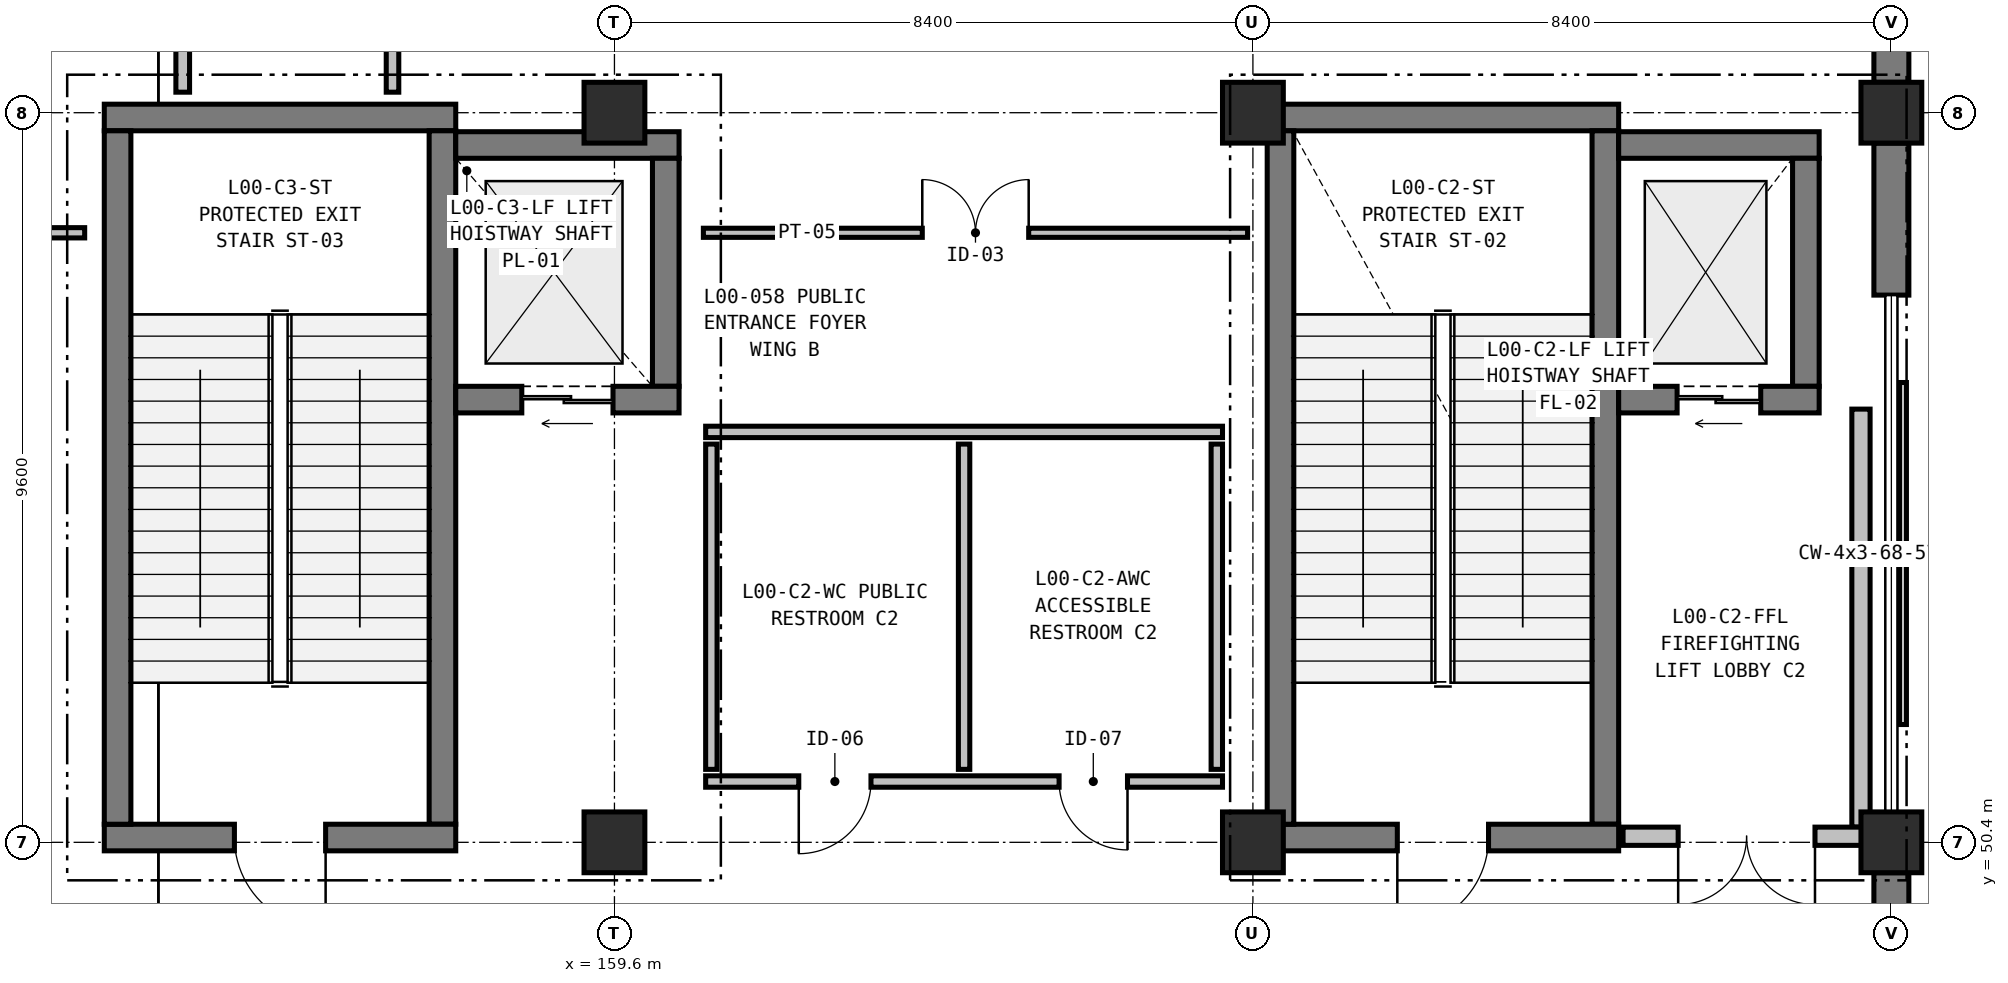
"""IFC4 building model, lengths in metres.
Left out: names, types, materials, properties, quantities, classifications, styles, units other than length and angle.
Written with IfcOpenShell. Run it as: python <this file> out.ifc"""

import sys

from ifc_helpers import new_model, si_unit, direction, frame, frame_2d, origin, origin_2d, place, context, subcontext, project, spatial, rectangle, extrude, element, fill, save


model = new_model("IFC4")
c1 = context("Model", 3, precision=1e-05, world=origin(), true_north=direction((0.0, 1.0)))
c2 = subcontext(c1, "Body", "Model", "MODEL_VIEW")
j1 = project(units=[si_unit("LENGTHUNIT", "METRE"), si_unit("PLANEANGLEUNIT", "RADIAN")], contexts=[c1])
p1 = place(None, origin())
s1 = spatial("IfcSite", under=j1, at=p1, CompositionType="ELEMENT")
p2 = place(p1, origin())
s2 = spatial("IfcBuilding", under=s1, at=p2, CompositionType="ELEMENT")
p3 = place(p2, origin())
s3 = spatial("IfcBuildingStorey", under=s2, at=p3, CompositionType="ELEMENT", Elevation=0.0)
for number, where, z_axis, x_axis in (
    (1, (159.6, 50.4, 0.0), (0.0, 0.0, 1.0), (1.0, 0.0, 0.0)),
    (2, (159.6, 60.0, 0.0), (0.0, 0.0, 1.0), (1.0, 0.0, 0.0)),
    (3, (168.0, 50.4, 0.0), (0.0, 0.0, 1.0), (1.0, 0.0, 0.0)),
    (4, (168.0, 60.0, 0.0), (0.0, 0.0, 1.0), (1.0, 0.0, 0.0)),
    (5, (176.4, 50.4, 0.0), (0.0, 0.0, 1.0), (1.0, 0.0, 0.0)),
    (6, (176.4, 60.0, 0.0), (0.0, 0.0, 1.0), (1.0, 0.0, 0.0)),
):
    element("IfcColumn", number, at=place(p3, frame(where, z_axis=z_axis, x_axis=x_axis)), inside=s3, PredefinedType="COLUMN", context=c2, shape_type="SweptSolid", body=[
        extrude(rectangle(XDim=0.8, YDim=0.8, at=origin_2d()), origin(), (0.0, 0.0, 1.0), 6.0),
    ])
p4 = place(p3, frame((176.4, 69.2, 0.0), z_axis=(0.0, 0.0, 1.0), x_axis=(0.0, -1.0, 0.0)))
e7 = element("IfcWall", 7, at=p4, inside=s3, PredefinedType="SOLIDWALL", context=c2, shape_type="SweptSolid", body=[
    extrude(rectangle(XDim=8.8, YDim=0.46, at=frame_2d((4.4, 0.0))), origin(), (0.0, 0.0, 1.0), 5.68),
])
p5 = place(p4, frame((3.4, 0.0, 0.0)))
e8 = element("IfcOpeningElement", 8, at=p5, cuts=e7, PredefinedType="OPENING", context=c2, shape_type="SweptSolid", body=[
    extrude(rectangle(XDim=2.0, YDim=2.3, at=frame_2d((1.0, 1.15))), frame((0.0, 0.24, 0.0), z_axis=(0.0, -1.0, 0.0), x_axis=(1.0, 0.0, 0.0)), (0.0, 0.0, 1.0), 0.48),
])
p6 = place(p3, frame((176.4, 59.6, 0.0), z_axis=(0.0, 0.0, 1.0), x_axis=(0.0, -1.0, 0.0)))
e9 = element("IfcWall", 9, at=p6, inside=s3, PredefinedType="SOLIDWALL", context=c2, shape_type="SweptSolid", body=[
    extrude(rectangle(XDim=2.0, YDim=0.46, at=frame_2d((1.0, 0.0))), origin(), (0.0, 0.0, 1.0), 5.68),
])
p7 = place(p3, frame((176.4, 50.0, 0.0), z_axis=(0.0, 0.0, 1.0), x_axis=(0.0, -1.0, 0.0)))
e10 = element("IfcWall", 10, at=p7, inside=s3, PredefinedType="SOLIDWALL", context=c2, shape_type="SweptSolid", body=[
    extrude(rectangle(XDim=4.0, YDim=0.46, at=frame_2d((2.0, 0.0))), origin(), (0.0, 0.0, 1.0), 5.68),
])
p8 = place(p3, frame((168.188, 59.937, 0.0), z_axis=(0.0, 0.0, 1.0), x_axis=(1.0, 0.0, 0.0)))
e11 = element("IfcWall", 11, at=p8, inside=s3, PredefinedType="SHEAR", context=c2, shape_type="SweptSolid", body=[
    extrude(rectangle(XDim=4.624, YDim=0.35, at=frame_2d((2.312, 0.0))), origin(), (0.0, 0.0, 1.0), 5.68),
])
p9 = place(p3, frame((172.637, 59.762, 0.0), z_axis=(0.0, 0.0, 1.0), x_axis=(0.0, -1.0, 0.0)))
e12 = element("IfcWall", 12, at=p9, inside=s3, PredefinedType="SHEAR", context=c2, shape_type="SweptSolid", body=[
    extrude(rectangle(XDim=9.124, YDim=0.35, at=frame_2d((4.562, 0.0))), origin(), (0.0, 0.0, 1.0), 5.68),
])
p10 = place(p3, frame((172.812, 50.463, 0.0), z_axis=(0.0, 0.0, 1.0), x_axis=(-1.0, 0.0, 0.0)))
e13 = element("IfcWall", 13, at=p10, inside=s3, PredefinedType="SHEAR", context=c2, shape_type="SweptSolid", body=[
    extrude(rectangle(XDim=4.624, YDim=0.35, at=frame_2d((2.312, 0.0))), origin(), (0.0, 0.0, 1.0), 5.68),
])
p11 = place(p10, frame((1.712, 0.0, 0.0)))
e14 = element("IfcOpeningElement", 14, at=p11, cuts=e13, PredefinedType="OPENING", context=c2, shape_type="SweptSolid", body=[
    extrude(rectangle(XDim=1.2, YDim=2.2, at=frame_2d((0.6, 1.1))), frame((0.0, 0.185, 0.0), z_axis=(0.0, -1.0, 0.0), x_axis=(1.0, 0.0, 0.0)), (0.0, 0.0, 1.0), 0.37),
])
p12 = place(p3, frame((168.363, 50.638, 0.0), z_axis=(0.0, 0.0, 1.0), x_axis=(0.0, 1.0, 0.0)))
e15 = element("IfcWall", 15, at=p12, inside=s3, PredefinedType="SHEAR", context=c2, shape_type="SweptSolid", body=[
    extrude(rectangle(XDim=9.124, YDim=0.35, at=frame_2d((4.562, 0.0))), origin(), (0.0, 0.0, 1.0), 5.68),
])
p13 = place(p3, frame((172.812, 59.575, 0.0), z_axis=(0.0, 0.0, 1.0), x_axis=(1.0, 0.0, 0.0)))
e16 = element("IfcWall", 16, at=p13, inside=s3, PredefinedType="SHEAR", context=c2, shape_type="SweptSolid", body=[
    extrude(rectangle(XDim=2.638, YDim=0.35, at=frame_2d((1.319, 0.0))), origin(), (0.0, 0.0, 1.0), 5.68),
])
p14 = place(p3, frame((175.275, 59.4, 0.0), z_axis=(0.0, 0.0, 1.0), x_axis=(0.0, -1.0, 0.0)))
e17 = element("IfcWall", 17, at=p14, inside=s3, PredefinedType="SHEAR", context=c2, shape_type="SweptSolid", body=[
    extrude(rectangle(XDim=3.0, YDim=0.35, at=frame_2d((1.5, 0.0))), origin(), (0.0, 0.0, 1.0), 5.68),
])
p15 = place(p3, frame((175.45, 56.225, 0.0), z_axis=(0.0, 0.0, 1.0), x_axis=(-1.0, 0.0, 0.0)))
e18 = element("IfcWall", 18, at=p15, inside=s3, PredefinedType="SHEAR", context=c2, shape_type="SweptSolid", body=[
    extrude(rectangle(XDim=2.638, YDim=0.35, at=frame_2d((1.319, 0.0))), origin(), (0.0, 0.0, 1.0), 5.68),
])
p16 = place(p15, frame((0.769, 0.0, 0.0)))
e19 = element("IfcOpeningElement", 19, at=p16, cuts=e18, PredefinedType="OPENING", context=c2, shape_type="SweptSolid", body=[
    extrude(rectangle(XDim=1.1, YDim=2.2, at=frame_2d((0.55, 1.1))), frame((0.0, 0.185, 0.0), z_axis=(0.0, -1.0, 0.0), x_axis=(1.0, 0.0, 0.0)), (0.0, 0.0, 1.0), 0.37),
])
p17 = place(p3, frame((176.0, 56.1, 0.0), z_axis=(0.0, 0.0, 1.0), x_axis=(0.0, -1.0, 0.0)))
e20 = element("IfcWall", 20, at=p17, inside=s3, PredefinedType="PARTITIONING", context=c2, shape_type="SweptSolid", body=[
    extrude(rectangle(XDim=5.5, YDim=0.24, at=frame_2d((2.75, 0.0))), origin(), (0.0, 0.0, 1.0), 5.005),
])
p18 = place(p3, frame((176.12, 50.48, 0.0), z_axis=(0.0, 0.0, 1.0), x_axis=(-1.0, 0.0, 0.0)))
e21 = element("IfcWall", 21, at=p18, inside=s3, PredefinedType="PARTITIONING", context=c2, shape_type="SweptSolid", body=[
    extrude(rectangle(XDim=3.25, YDim=0.24, at=frame_2d((1.625, 0.0))), origin(), (0.0, 0.0, 1.0), 5.005),
])
p19 = place(p18, frame((0.725, 0.0, 0.0)))
e22 = element("IfcOpeningElement", 22, at=p19, cuts=e21, PredefinedType="OPENING", context=c2, shape_type="SweptSolid", body=[
    extrude(rectangle(XDim=1.8, YDim=2.25, at=frame_2d((0.9, 1.125))), frame((0.0, 0.13, 0.0), z_axis=(0.0, -1.0, 0.0), x_axis=(1.0, 0.0, 0.0)), (0.0, 0.0, 1.0), 0.26),
])
p20 = place(p3, frame((167.6, 51.2, 0.0), z_axis=(0.0, 0.0, 1.0), x_axis=(-1.0, 0.0, 0.0)))
e23 = element("IfcWall", 23, at=p20, inside=s3, PredefinedType="PARTITIONING", context=c2, shape_type="SweptSolid", body=[
    extrude(rectangle(XDim=6.8, YDim=0.15, at=frame_2d((3.4, 0.0))), origin(), (0.0, 0.0, 1.0), 5.68),
])
p21 = place(p20, frame((1.25, 0.0, 0.0)))
e24 = element("IfcOpeningElement", 24, at=p21, cuts=e23, PredefinedType="OPENING", context=c2, shape_type="SweptSolid", body=[
    extrude(rectangle(XDim=0.9, YDim=2.1, at=frame_2d((0.45, 1.05))), frame((0.0, 0.085, 0.0), z_axis=(0.0, -1.0, 0.0), x_axis=(1.0, 0.0, 0.0)), (0.0, 0.0, 1.0), 0.17),
])
p22 = place(p20, frame((4.625, 0.0, 0.0)))
e25 = element("IfcOpeningElement", 25, at=p22, cuts=e23, PredefinedType="OPENING", context=c2, shape_type="SweptSolid", body=[
    extrude(rectangle(XDim=0.95, YDim=2.15, at=frame_2d((0.475, 1.075))), frame((0.0, 0.085, 0.0), z_axis=(0.0, -1.0, 0.0), x_axis=(1.0, 0.0, 0.0)), (0.0, 0.0, 1.0), 0.17),
])
p23 = place(p3, frame((160.8, 55.8, 0.0), z_axis=(0.0, 0.0, 1.0), x_axis=(1.0, 0.0, 0.0)))
e26 = element("IfcWall", 26, at=p23, inside=s3, PredefinedType="PARTITIONING", context=c2, shape_type="SweptSolid", body=[
    extrude(rectangle(XDim=6.8, YDim=0.15, at=frame_2d((3.4, 0.0))), origin(), (0.0, 0.0, 1.0), 5.68),
])
for number, where, z_axis, x_axis in (
    (27, (160.875, 51.36, 0.0), (0.0, 0.0, 1.0), (0.0, 1.0, 0.0)),
    (28, (164.2, 51.36, 0.0), (0.0, 0.0, 1.0), (0.0, 1.0, 0.0)),
    (29, (167.525, 51.36, 0.0), (0.0, 0.0, 1.0), (0.0, 1.0, 0.0)),
):
    element("IfcWall", number, at=place(p3, frame(where, z_axis=z_axis, x_axis=x_axis)), inside=s3, PredefinedType="PARTITIONING", context=c2, shape_type="SweptSolid", body=[
        extrude(rectangle(XDim=4.28, YDim=0.15, at=frame_2d((2.14, 0.0))), origin(), (0.0, 0.0, 1.0), 5.68),
    ])
p24 = place(p3, frame((152.888, 59.937, 0.0), z_axis=(0.0, 0.0, 1.0), x_axis=(1.0, 0.0, 0.0)))
e30 = element("IfcWall", 30, at=p24, inside=s3, PredefinedType="SHEAR", context=c2, shape_type="SweptSolid", body=[
    extrude(rectangle(XDim=4.624, YDim=0.35, at=frame_2d((2.312, 0.0))), origin(), (0.0, 0.0, 1.0), 5.68),
])
p25 = place(p3, frame((157.337, 59.762, 0.0), z_axis=(0.0, 0.0, 1.0), x_axis=(0.0, -1.0, 0.0)))
e31 = element("IfcWall", 31, at=p25, inside=s3, PredefinedType="SHEAR", context=c2, shape_type="SweptSolid", body=[
    extrude(rectangle(XDim=9.124, YDim=0.35, at=frame_2d((4.562, 0.0))), origin(), (0.0, 0.0, 1.0), 5.68),
])
p26 = place(p3, frame((157.512, 50.463, 0.0), z_axis=(0.0, 0.0, 1.0), x_axis=(-1.0, 0.0, 0.0)))
e32 = element("IfcWall", 32, at=p26, inside=s3, PredefinedType="SHEAR", context=c2, shape_type="SweptSolid", body=[
    extrude(rectangle(XDim=4.624, YDim=0.35, at=frame_2d((2.312, 0.0))), origin(), (0.0, 0.0, 1.0), 5.68),
])
p27 = place(p26, frame((1.712, 0.0, 0.0)))
e33 = element("IfcOpeningElement", 33, at=p27, cuts=e32, PredefinedType="OPENING", context=c2, shape_type="SweptSolid", body=[
    extrude(rectangle(XDim=1.2, YDim=2.2, at=frame_2d((0.6, 1.1))), frame((0.0, 0.185, 0.0), z_axis=(0.0, -1.0, 0.0), x_axis=(1.0, 0.0, 0.0)), (0.0, 0.0, 1.0), 0.37),
])
p28 = place(p3, frame((153.063, 50.638, 0.0), z_axis=(0.0, 0.0, 1.0), x_axis=(0.0, 1.0, 0.0)))
e34 = element("IfcWall", 34, at=p28, inside=s3, PredefinedType="SHEAR", context=c2, shape_type="SweptSolid", body=[
    extrude(rectangle(XDim=9.124, YDim=0.35, at=frame_2d((4.562, 0.0))), origin(), (0.0, 0.0, 1.0), 5.68),
])
p29 = place(p3, frame((157.512, 59.575, 0.0), z_axis=(0.0, 0.0, 1.0), x_axis=(1.0, 0.0, 0.0)))
e35 = element("IfcWall", 35, at=p29, inside=s3, PredefinedType="SHEAR", context=c2, shape_type="SweptSolid", body=[
    extrude(rectangle(XDim=2.938, YDim=0.35, at=frame_2d((1.469, 0.0))), origin(), (0.0, 0.0, 1.0), 5.68),
])
p30 = place(p3, frame((160.275, 59.4, 0.0), z_axis=(0.0, 0.0, 1.0), x_axis=(0.0, -1.0, 0.0)))
e36 = element("IfcWall", 36, at=p30, inside=s3, PredefinedType="SHEAR", context=c2, shape_type="SweptSolid", body=[
    extrude(rectangle(XDim=3.0, YDim=0.35, at=frame_2d((1.5, 0.0))), origin(), (0.0, 0.0, 1.0), 5.68),
])
p31 = place(p3, frame((160.45, 56.225, 0.0), z_axis=(0.0, 0.0, 1.0), x_axis=(-1.0, 0.0, 0.0)))
e37 = element("IfcWall", 37, at=p31, inside=s3, PredefinedType="SHEAR", context=c2, shape_type="SweptSolid", body=[
    extrude(rectangle(XDim=2.938, YDim=0.35, at=frame_2d((1.469, 0.0))), origin(), (0.0, 0.0, 1.0), 5.68),
])
p32 = place(p31, frame((0.869, 0.0, 0.0)))
e38 = element("IfcOpeningElement", 38, at=p32, cuts=e37, PredefinedType="OPENING", context=c2, shape_type="SweptSolid", body=[
    extrude(rectangle(XDim=1.2, YDim=2.2, at=frame_2d((0.6, 1.1))), frame((0.0, 0.185, 0.0), z_axis=(0.0, -1.0, 0.0), x_axis=(1.0, 0.0, 0.0)), (0.0, 0.0, 1.0), 0.37),
])
p33 = place(p3, frame((134.8, 58.42, 0.0), z_axis=(0.0, 0.0, 1.0), x_axis=(1.0, 0.0, 0.0)))
e39 = element("IfcWall", 39, at=p33, inside=s3, PredefinedType="PARTITIONING", context=c2, shape_type="SweptSolid", body=[
    extrude(rectangle(XDim=17.83, YDim=0.135, at=frame_2d((8.915, 0.0))), origin(), (0.0, 0.0, 1.0), 4.855),
])
p34 = place(p33, frame((9.115, 0.0, 0.0)))
e40 = element("IfcOpeningElement", 40, at=p34, cuts=e39, PredefinedType="OPENING", context=c2, shape_type="SweptSolid", body=[
    extrude(rectangle(XDim=1.6, YDim=2.35, at=frame_2d((0.8, 1.175))), frame((0.0, 0.077, 0.0), z_axis=(0.0, -1.0, 0.0), x_axis=(1.0, 0.0, 0.0)), (0.0, 0.0, 1.0), 0.155),
])
p35 = place(p3, frame((160.77, 58.42, 0.0), z_axis=(0.0, 0.0, 1.0), x_axis=(1.0, 0.0, 0.0)))
e41 = element("IfcWall", 41, at=p35, inside=s3, PredefinedType="PARTITIONING", context=c2, shape_type="SweptSolid", body=[
    extrude(rectangle(XDim=7.16, YDim=0.12, at=frame_2d((3.58, 0.0))), origin(), (0.0, 0.0, 1.0), 4.855),
])
p36 = place(p35, frame((2.88, 0.0, 0.0)))
e42 = element("IfcOpeningElement", 42, at=p36, cuts=e41, PredefinedType="OPENING", context=c2, shape_type="SweptSolid", body=[
    extrude(rectangle(XDim=1.4, YDim=2.3, at=frame_2d((0.7, 1.15))), frame((0.0, 0.07, 0.0), z_axis=(0.0, -1.0, 0.0), x_axis=(1.0, 0.0, 0.0)), (0.0, 0.0, 1.0), 0.14),
])
p37 = place(p3, frame((153.92, 71.17, 0.0), z_axis=(0.0, 0.0, 1.0), x_axis=(0.0, -1.0, 0.0)))
e43 = element("IfcWall", 43, at=p37, inside=s3, PredefinedType="PARTITIONING", context=c2, shape_type="SweptSolid", body=[
    extrude(rectangle(XDim=10.9, YDim=0.18, at=frame_2d((5.45, 0.0))), origin(), (0.0, 0.0, 1.0), 5.005),
])
p38 = place(p37, frame((4.925, 0.0, 0.0)))
e44 = element("IfcOpeningElement", 44, at=p38, cuts=e43, PredefinedType="OPENING", context=c2, shape_type="SweptSolid", body=[
    extrude(rectangle(XDim=1.05, YDim=2.2, at=frame_2d((0.525, 1.1))), frame((0.0, 0.1, 0.0), z_axis=(0.0, -1.0, 0.0), x_axis=(1.0, 0.0, 0.0)), (0.0, 0.0, 1.0), 0.2),
])
p39 = place(p3, frame((156.68, 60.27, 0.0), z_axis=(0.0, 0.0, 1.0), x_axis=(0.0, 1.0, 0.0)))
e45 = element("IfcWall", 45, at=p39, inside=s3, PredefinedType="PARTITIONING", context=c2, shape_type="SweptSolid", body=[
    extrude(rectangle(XDim=10.9, YDim=0.165, at=frame_2d((5.45, 0.0))), origin(), (0.0, 0.0, 1.0), 5.005),
])
p40 = place(p39, frame((4.95, 0.0, 0.0)))
e46 = element("IfcOpeningElement", 46, at=p40, cuts=e45, PredefinedType="OPENING", context=c2, shape_type="SweptSolid", body=[
    extrude(rectangle(XDim=1.0, YDim=2.15, at=frame_2d((0.5, 1.075))), frame((0.0, 0.093, 0.0), z_axis=(0.0, -1.0, 0.0), x_axis=(1.0, 0.0, 0.0)), (0.0, 0.0, 1.0), 0.185),
])
p41 = place(p11, origin())
e47 = element("IfcDoor", 47, at=p41, inside=s3, OperationType="SINGLE_SWING_RIGHT", PredefinedType="DOOR", context=c2, shape_type="SweptSolid", body=[
    extrude(rectangle(XDim=1.2, YDim=2.2, at=frame_2d((0.6, 1.1))), frame((0.0, 0.025, 0.0), z_axis=(0.0, -1.0, 0.0), x_axis=(1.0, 0.0, 0.0)), (0.0, 0.0, 1.0), 0.05),
])
fill(e14, e47)
p42 = place(p16, origin())
e48 = element("IfcDoor", 48, at=p42, inside=s3, OperationType="DOUBLE_DOOR_SLIDING", PredefinedType="DOOR", context=c2, shape_type="SweptSolid", body=[
    extrude(rectangle(XDim=1.1, YDim=2.2, at=frame_2d((0.55, 1.1))), frame((0.0, 0.025, 0.0), z_axis=(0.0, -1.0, 0.0), x_axis=(1.0, 0.0, 0.0)), (0.0, 0.0, 1.0), 0.05),
])
fill(e19, e48)
p43 = place(p19, origin())
e49 = element("IfcDoor", 49, at=p43, inside=s3, OperationType="DOUBLE_DOOR_SINGLE_SWING", PredefinedType="DOOR", context=c2, shape_type="SweptSolid", body=[
    extrude(rectangle(XDim=1.8, YDim=2.25, at=frame_2d((0.9, 1.125))), frame((0.0, 0.025, 0.0), z_axis=(0.0, -1.0, 0.0), x_axis=(1.0, 0.0, 0.0)), (0.0, 0.0, 1.0), 0.05),
])
fill(e22, e49)
p44 = place(p21, origin())
e50 = element("IfcDoor", 50, at=p44, inside=s3, OperationType="SINGLE_SWING_LEFT", PredefinedType="DOOR", context=c2, shape_type="SweptSolid", body=[
    extrude(rectangle(XDim=0.9, YDim=2.1, at=frame_2d((0.45, 1.05))), frame((0.0, 0.025, 0.0), z_axis=(0.0, -1.0, 0.0), x_axis=(1.0, 0.0, 0.0)), (0.0, 0.0, 1.0), 0.05),
])
fill(e24, e50)
p45 = place(p22, origin())
e51 = element("IfcDoor", 51, at=p45, inside=s3, OperationType="SINGLE_SWING_RIGHT", PredefinedType="DOOR", context=c2, shape_type="SweptSolid", body=[
    extrude(rectangle(XDim=0.95, YDim=2.15, at=frame_2d((0.475, 1.075))), frame((0.0, 0.025, 0.0), z_axis=(0.0, -1.0, 0.0), x_axis=(1.0, 0.0, 0.0)), (0.0, 0.0, 1.0), 0.05),
])
fill(e25, e51)
p46 = place(p27, origin())
e52 = element("IfcDoor", 52, at=p46, inside=s3, OperationType="SINGLE_SWING_LEFT", PredefinedType="DOOR", context=c2, shape_type="SweptSolid", body=[
    extrude(rectangle(XDim=1.2, YDim=2.2, at=frame_2d((0.6, 1.1))), frame((0.0, 0.025, 0.0), z_axis=(0.0, -1.0, 0.0), x_axis=(1.0, 0.0, 0.0)), (0.0, 0.0, 1.0), 0.05),
])
fill(e33, e52)
p47 = place(p32, origin())
e53 = element("IfcDoor", 53, at=p47, inside=s3, OperationType="DOUBLE_DOOR_SLIDING", PredefinedType="DOOR", context=c2, shape_type="SweptSolid", body=[
    extrude(rectangle(XDim=1.2, YDim=2.2, at=frame_2d((0.6, 1.1))), frame((0.0, 0.025, 0.0), z_axis=(0.0, -1.0, 0.0), x_axis=(1.0, 0.0, 0.0)), (0.0, 0.0, 1.0), 0.05),
])
fill(e38, e53)
p48 = place(p36, origin())
e54 = element("IfcDoor", 54, at=p48, inside=s3, OperationType="DOUBLE_DOOR_SINGLE_SWING", PredefinedType="DOOR", context=c2, shape_type="SweptSolid", body=[
    extrude(rectangle(XDim=1.4, YDim=2.3, at=frame_2d((0.7, 1.15))), frame((0.0, 0.025, 0.0), z_axis=(0.0, -1.0, 0.0), x_axis=(1.0, 0.0, 0.0)), (0.0, 0.0, 1.0), 0.05),
])
fill(e42, e54)
save(model, sys.argv[1])
